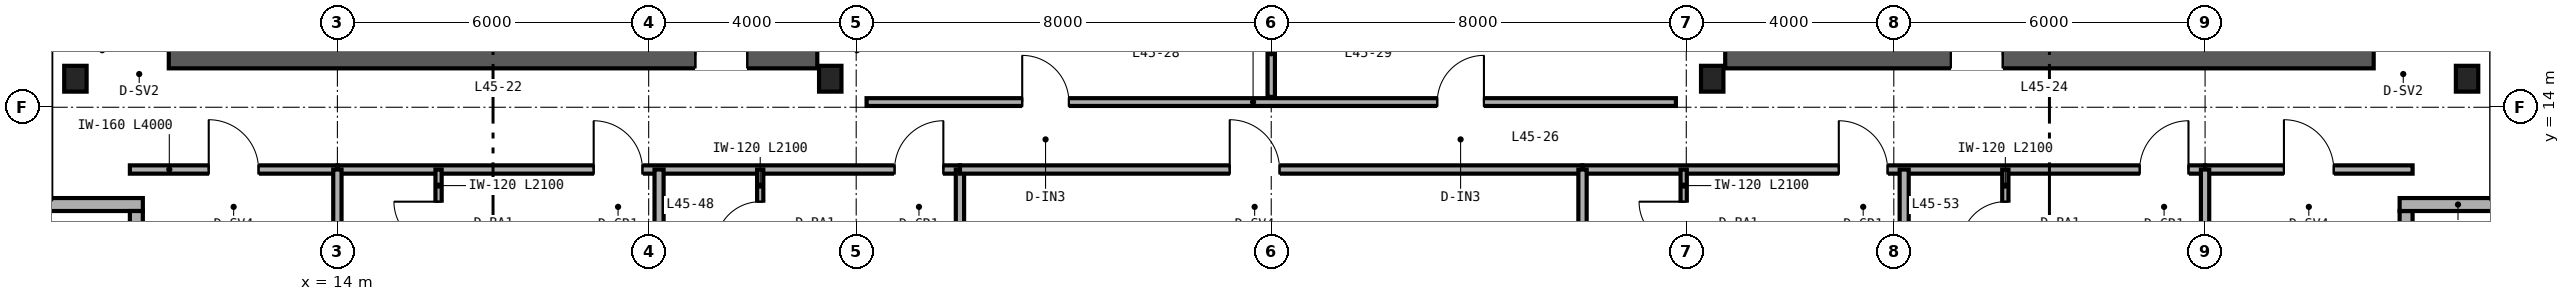
"""IFC4 building model, lengths in metres.
Left out: names, types, materials, properties, quantities, classifications, styles, units other than length and angle.
Written with IfcOpenShell. Run it as: python <this file> out.ifc"""

import sys

from ifc_helpers import new_model, si_unit, direction, frame, frame_2d, origin, origin_2d, place, context, subcontext, project, spatial, rectangle, i_section, extrude, source, transform, mapped, element, fill, save


model = new_model("IFC4")
c1 = context("Model", 3, precision=1e-05, world=origin(), true_north=direction((0.0, 1.0)))
c2 = subcontext(c1, "Body", "Model", "MODEL_VIEW")
j1 = project(units=[si_unit("LENGTHUNIT", "METRE"), si_unit("PLANEANGLEUNIT", "RADIAN")], contexts=[c1])
p1 = place(None, origin())
s1 = spatial("IfcSite", under=j1, at=p1, CompositionType="ELEMENT")
p2 = place(p1, origin())
s2 = spatial("IfcBuilding", under=s1, at=p2, CompositionType="ELEMENT")
p3 = place(p2, frame((0.0, 0.0, 181.2)))
s3 = spatial("IfcBuildingStorey", under=s2, at=p3, CompositionType="ELEMENT", Elevation=181.2)
p4 = place(p3, frame((10.75, 15.0, 0.0), z_axis=(0.0, 0.0, 1.0), x_axis=(1.0, 0.0, 0.0)))
e1 = element("IfcWall", 1, at=p4, inside=s3, PredefinedType="SHEAR", context=c2, shape_type="SweptSolid", body=[
    extrude(rectangle(XDim=12.5, YDim=0.5, at=frame_2d((6.25, 0.0))), origin(), (0.0, 0.0, 1.0), 3.37),
])
p5 = place(p4, frame((10.15, 0.0, 0.0)))
e2 = element("IfcOpeningElement", 2, at=p5, cuts=e1, PredefinedType="OPENING", context=c2, shape_type="SweptSolid", body=[
    extrude(rectangle(XDim=1.0, YDim=2.15, at=frame_2d((0.5, 1.075))), frame((0.0, 0.26, 0.0), z_axis=(0.0, -1.0, 0.0), x_axis=(1.0, 0.0, 0.0)), (0.0, 0.0, 1.0), 0.52),
])
p6 = place(p3, frame((40.75, 15.0, 0.0), z_axis=(0.0, 0.0, 1.0), x_axis=(1.0, 0.0, 0.0)))
e3 = element("IfcWall", 3, at=p6, inside=s3, PredefinedType="SHEAR", context=c2, shape_type="SweptSolid", body=[
    extrude(rectangle(XDim=12.5, YDim=0.5, at=frame_2d((6.25, 0.0))), origin(), (0.0, 0.0, 1.0), 3.37),
])
p7 = place(p6, frame((4.35, 0.0, 0.0)))
e4 = element("IfcOpeningElement", 4, at=p7, cuts=e3, PredefinedType="OPENING", context=c2, shape_type="SweptSolid", body=[
    extrude(rectangle(XDim=1.0, YDim=2.15, at=frame_2d((0.5, 1.075))), frame((0.0, 0.26, 0.0), z_axis=(0.0, -1.0, 0.0), x_axis=(1.0, 0.0, 0.0)), (0.0, 0.0, 1.0), 0.52),
])
m1 = source(origin(), c2, "Body", "SweptSolid", [
    extrude(i_section(OverallWidth=0.432, OverallDepth=0.498, WebThickness=0.056, FlangeThickness=0.089, FilletRadius=0.025, at=origin_2d()), origin(), (0.0, 0.0, 1.0), 3.37),
])
for number, where, z_axis, x_axis in (
    (5, (8.95, 14.55, 0.0), (0.0, 0.0, 1.0), (1.0, 0.0, 0.0)),
    (6, (23.5, 14.55, 0.0), (0.0, 0.0, 1.0), (1.0, 0.0, 0.0)),
    (7, (40.5, 14.55, 0.0), (0.0, 0.0, 1.0), (1.0, 0.0, 0.0)),
    (8, (55.05, 14.55, 0.0), (0.0, 0.0, 1.0), (1.0, 0.0, 0.0)),
):
    element("IfcColumn", number, at=place(p3, frame(where, z_axis=z_axis, x_axis=x_axis)), inside=s3, PredefinedType="COLUMN", context=c2, shape_type="MappedRepresentation", body=[
        mapped(m1, transform((0.0, 0.0, 0.0), scale=1.0)),
    ])
p8 = place(p3, frame((53.875, 10.0, 0.0), z_axis=(0.0, 0.0, 1.0), x_axis=(0.0, 1.0, 0.0)))
e9 = element("IfcWall", 9, at=p8, inside=s3, PredefinedType="SOLIDWALL", context=c2, shape_type="SweptSolid", body=[
    extrude(rectangle(XDim=2.0, YDim=0.25, at=frame_2d((1.0, 0.0))), origin(), (0.0, 0.0, 1.0), 3.37),
])
for number, where, z_axis, x_axis in (
    (10, (53.75, 12.125, 0.0), (0.0, 0.0, 1.0), (1.0, 0.0, 0.0)),
    (11, (8.0, 12.125, 0.0), (0.0, 0.0, 1.0), (1.0, 0.0, 0.0)),
):
    element("IfcWall", number, at=place(p3, frame(where, z_axis=z_axis, x_axis=x_axis)), inside=s3, PredefinedType="SOLIDWALL", context=c2, shape_type="SweptSolid", body=[
        extrude(rectangle(XDim=2.25, YDim=0.25, at=frame_2d((1.125, 0.0))), origin(), (0.0, 0.0, 1.0), 3.37),
    ])
p9 = place(p3, frame((10.125, 12.0, 0.0), z_axis=(0.0, 0.0, 1.0), x_axis=(0.0, -1.0, 0.0)))
e12 = element("IfcWall", 12, at=p9, inside=s3, PredefinedType="SOLIDWALL", context=c2, shape_type="SweptSolid", body=[
    extrude(rectangle(XDim=2.0, YDim=0.25, at=frame_2d((1.0, 0.0))), origin(), (0.0, 0.0, 1.0), 3.37),
])
p10 = place(p3, frame((24.2, 14.1, 0.0), z_axis=(0.0, 0.0, 1.0), x_axis=(1.0, 0.0, 0.0)))
e13 = element("IfcWall", 13, at=p10, inside=s3, PredefinedType="PARTITIONING", context=c2, shape_type="SweptSolid", body=[
    extrude(rectangle(XDim=15.6, YDim=0.15, at=frame_2d((7.8, 0.0))), origin(), (0.0, 0.0, 1.0), 3.37),
])
p11 = place(p10, frame((3.0, 0.0, 0.0)))
e14 = element("IfcOpeningElement", 14, at=p11, cuts=e13, PredefinedType="OPENING", context=c2, shape_type="SweptSolid", body=[
    extrude(rectangle(XDim=0.9, YDim=2.15, at=frame_2d((0.45, 1.075))), frame((0.0, 0.085, 0.0), z_axis=(0.0, -1.0, 0.0), x_axis=(1.0, 0.0, 0.0)), (0.0, 0.0, 1.0), 0.17),
])
p12 = place(p10, frame((11.0, 0.0, 0.0)))
e15 = element("IfcOpeningElement", 15, at=p12, cuts=e13, PredefinedType="OPENING", context=c2, shape_type="SweptSolid", body=[
    extrude(rectangle(XDim=0.9, YDim=2.15, at=frame_2d((0.45, 1.075))), frame((0.0, 0.085, 0.0), z_axis=(0.0, -1.0, 0.0), x_axis=(1.0, 0.0, 0.0)), (0.0, 0.0, 1.0), 0.17),
])
p13 = place(p3, frame((32.0, 14.2, 0.0), z_axis=(0.0, 0.0, 1.0), x_axis=(0.0, 1.0, 0.0)))
e16 = element("IfcWall", 16, at=p13, inside=s3, PredefinedType="PARTITIONING", context=c2, shape_type="SweptSolid", body=[
    extrude(rectangle(XDim=1.68, YDim=0.142, at=frame_2d((0.84, 0.0))), origin(), (0.0, 0.0, 1.0), 3.37),
])
p14 = place(p3, frame((10.0, 12.8, 0.0), z_axis=(0.0, 0.0, 1.0), x_axis=(1.0, 0.0, 0.0)))
e17 = element("IfcWall", 17, at=p14, inside=s3, PredefinedType="PARTITIONING", context=c2, shape_type="SweptSolid", body=[
    extrude(rectangle(XDim=4.0, YDim=0.16, at=frame_2d((2.0, 0.0))), origin(), (0.0, 0.0, 1.0), 3.37),
])
p15 = place(p14, frame((1.52, 0.0, 0.0)))
e18 = element("IfcOpeningElement", 18, at=p15, cuts=e17, PredefinedType="OPENING", context=c2, shape_type="SweptSolid", body=[
    extrude(rectangle(XDim=0.96, YDim=2.15, at=frame_2d((0.48, 1.075))), frame((0.0, 0.09, 0.0), z_axis=(0.0, -1.0, 0.0), x_axis=(1.0, 0.0, 0.0)), (0.0, 0.0, 1.0), 0.18),
])
p16 = place(p3, frame((50.0, 12.8, 0.0), z_axis=(0.0, 0.0, 1.0), x_axis=(1.0, 0.0, 0.0)))
e19 = element("IfcWall", 19, at=p16, inside=s3, PredefinedType="PARTITIONING", context=c2, shape_type="SweptSolid", body=[
    extrude(rectangle(XDim=4.0, YDim=0.16, at=frame_2d((2.0, 0.0))), origin(), (0.0, 0.0, 1.0), 3.37),
])
p17 = place(p16, frame((1.52, 0.0, 0.0)))
e20 = element("IfcOpeningElement", 20, at=p17, cuts=e19, PredefinedType="OPENING", context=c2, shape_type="SweptSolid", body=[
    extrude(rectangle(XDim=0.96, YDim=2.15, at=frame_2d((0.48, 1.075))), frame((0.0, 0.09, 0.0), z_axis=(0.0, -1.0, 0.0), x_axis=(1.0, 0.0, 0.0)), (0.0, 0.0, 1.0), 0.18),
])
p18 = place(p3, frame((14.0, 12.8, 0.0), z_axis=(0.0, 0.0, 1.0), x_axis=(1.0, 0.0, 0.0)))
e21 = element("IfcWall", 21, at=p18, inside=s3, PredefinedType="PARTITIONING", context=c2, shape_type="SweptSolid", body=[
    extrude(rectangle(XDim=12.0, YDim=0.16, at=frame_2d((6.0, 0.0))), origin(), (0.0, 0.0, 1.0), 2.913),
])
p19 = place(p18, frame((4.94, 0.0, 0.0)))
e22 = element("IfcOpeningElement", 22, at=p19, cuts=e21, PredefinedType="OPENING", context=c2, shape_type="SweptSolid", body=[
    extrude(rectangle(XDim=0.94, YDim=2.15, at=frame_2d((0.47, 1.075))), frame((0.0, 0.09, 0.0), z_axis=(0.0, -1.0, 0.0), x_axis=(1.0, 0.0, 0.0)), (0.0, 0.0, 1.0), 0.18),
])
p20 = place(p18, frame((10.74, 0.0, 0.0)))
e23 = element("IfcOpeningElement", 23, at=p20, cuts=e21, PredefinedType="OPENING", context=c2, shape_type="SweptSolid", body=[
    extrude(rectangle(XDim=0.94, YDim=2.15, at=frame_2d((0.47, 1.075))), frame((0.0, 0.09, 0.0), z_axis=(0.0, -1.0, 0.0), x_axis=(1.0, 0.0, 0.0)), (0.0, 0.0, 1.0), 0.18),
])
p21 = place(p3, frame((14.0, 6.36, 0.0), z_axis=(0.0, 0.0, 1.0), x_axis=(0.0, 1.0, 0.0)))
e24 = element("IfcWall", 24, at=p21, inside=s3, PredefinedType="PARTITIONING", context=c2, shape_type="SweptSolid", body=[
    extrude(rectangle(XDim=6.44, YDim=0.16, at=frame_2d((3.22, 0.0))), origin(), (0.0, 0.0, 1.0), 2.677),
])
p22 = place(p3, frame((26.0, 6.36, 0.0), z_axis=(0.0, 0.0, 1.0), x_axis=(0.0, 1.0, 0.0)))
e25 = element("IfcWall", 25, at=p22, inside=s3, PredefinedType="PARTITIONING", context=c2, shape_type="SweptSolid", body=[
    extrude(rectangle(XDim=6.44, YDim=0.16, at=frame_2d((3.22, 0.0))), origin(), (0.0, 0.0, 1.0), 2.443),
])
p23 = place(p3, frame((20.2, 6.36, 0.0), z_axis=(0.0, 0.0, 1.0), x_axis=(0.0, 1.0, 0.0)))
e26 = element("IfcWall", 26, at=p23, inside=s3, PredefinedType="PARTITIONING", context=c2, shape_type="SweptSolid", body=[
    extrude(rectangle(XDim=6.44, YDim=0.175, at=frame_2d((3.22, 0.0))), origin(), (0.0, 0.0, 1.0), 2.677),
])
p24 = place(p3, frame((15.95, 10.7, 0.0), z_axis=(0.0, 0.0, 1.0), x_axis=(0.0, 1.0, 0.0)))
e27 = element("IfcWall", 27, at=p24, inside=s3, PredefinedType="PARTITIONING", context=c2, shape_type="SweptSolid", body=[
    extrude(rectangle(XDim=2.1, YDim=0.12, at=frame_2d((1.05, 0.0))), origin(), (0.0, 0.0, 1.0), 3.37),
])
p25 = place(p24, frame((0.62, 0.0, 0.0)))
e28 = element("IfcOpeningElement", 28, at=p25, cuts=e27, PredefinedType="OPENING", context=c2, shape_type="SweptSolid", body=[
    extrude(rectangle(XDim=0.86, YDim=2.1, at=frame_2d((0.43, 1.05))), frame((0.0, 0.07, 0.0), z_axis=(0.0, -1.0, 0.0), x_axis=(1.0, 0.0, 0.0)), (0.0, 0.0, 1.0), 0.14),
])
p26 = place(p3, frame((22.15, 10.7, 0.0), z_axis=(0.0, 0.0, 1.0), x_axis=(0.0, 1.0, 0.0)))
e29 = element("IfcWall", 29, at=p26, inside=s3, PredefinedType="PARTITIONING", context=c2, shape_type="SweptSolid", body=[
    extrude(rectangle(XDim=2.1, YDim=0.12, at=frame_2d((1.05, 0.0))), origin(), (0.0, 0.0, 1.0), 3.37),
])
p27 = place(p26, frame((0.62, 0.0, 0.0)))
e30 = element("IfcOpeningElement", 30, at=p27, cuts=e29, PredefinedType="OPENING", context=c2, shape_type="SweptSolid", body=[
    extrude(rectangle(XDim=0.86, YDim=2.1, at=frame_2d((0.43, 1.05))), frame((0.0, 0.07, 0.0), z_axis=(0.0, -1.0, 0.0), x_axis=(1.0, 0.0, 0.0)), (0.0, 0.0, 1.0), 0.14),
])
p28 = place(p3, frame((26.0, 12.8, 0.0), z_axis=(0.0, 0.0, 1.0), x_axis=(1.0, 0.0, 0.0)))
e31 = element("IfcWall", 31, at=p28, inside=s3, PredefinedType="PARTITIONING", context=c2, shape_type="SweptSolid", body=[
    extrude(rectangle(XDim=12.0, YDim=0.16, at=frame_2d((6.0, 0.0))), origin(), (0.0, 0.0, 1.0), 3.37),
])
p29 = place(p28, frame((5.2, 0.0, 0.0)))
e32 = element("IfcOpeningElement", 32, at=p29, cuts=e31, PredefinedType="OPENING", context=c2, shape_type="SweptSolid", body=[
    extrude(rectangle(XDim=0.96, YDim=2.15, at=frame_2d((0.48, 1.075))), frame((0.0, 0.09, 0.0), z_axis=(0.0, -1.0, 0.0), x_axis=(1.0, 0.0, 0.0)), (0.0, 0.0, 1.0), 0.18),
])
p30 = place(p3, frame((38.0, 12.8, 0.0), z_axis=(0.0, 0.0, 1.0), x_axis=(1.0, 0.0, 0.0)))
e33 = element("IfcWall", 33, at=p30, inside=s3, PredefinedType="PARTITIONING", context=c2, shape_type="SweptSolid", body=[
    extrude(rectangle(XDim=12.0, YDim=0.16, at=frame_2d((6.0, 0.0))), origin(), (0.0, 0.0, 1.0), 2.913),
])
p31 = place(p30, frame((4.94, 0.0, 0.0)))
e34 = element("IfcOpeningElement", 34, at=p31, cuts=e33, PredefinedType="OPENING", context=c2, shape_type="SweptSolid", body=[
    extrude(rectangle(XDim=0.94, YDim=2.15, at=frame_2d((0.47, 1.075))), frame((0.0, 0.09, 0.0), z_axis=(0.0, -1.0, 0.0), x_axis=(1.0, 0.0, 0.0)), (0.0, 0.0, 1.0), 0.18),
])
p32 = place(p30, frame((10.74, 0.0, 0.0)))
e35 = element("IfcOpeningElement", 35, at=p32, cuts=e33, PredefinedType="OPENING", context=c2, shape_type="SweptSolid", body=[
    extrude(rectangle(XDim=0.94, YDim=2.15, at=frame_2d((0.47, 1.075))), frame((0.0, 0.09, 0.0), z_axis=(0.0, -1.0, 0.0), x_axis=(1.0, 0.0, 0.0)), (0.0, 0.0, 1.0), 0.18),
])
p33 = place(p3, frame((38.0, 6.36, 0.0), z_axis=(0.0, 0.0, 1.0), x_axis=(0.0, 1.0, 0.0)))
e36 = element("IfcWall", 36, at=p33, inside=s3, PredefinedType="PARTITIONING", context=c2, shape_type="SweptSolid", body=[
    extrude(rectangle(XDim=6.44, YDim=0.16, at=frame_2d((3.22, 0.0))), origin(), (0.0, 0.0, 1.0), 2.443),
])
p34 = place(p3, frame((50.0, 6.36, 0.0), z_axis=(0.0, 0.0, 1.0), x_axis=(0.0, 1.0, 0.0)))
e37 = element("IfcWall", 37, at=p34, inside=s3, PredefinedType="PARTITIONING", context=c2, shape_type="SweptSolid", body=[
    extrude(rectangle(XDim=6.44, YDim=0.16, at=frame_2d((3.22, 0.0))), origin(), (0.0, 0.0, 1.0), 2.677),
])
p35 = place(p3, frame((44.2, 6.36, 0.0), z_axis=(0.0, 0.0, 1.0), x_axis=(0.0, 1.0, 0.0)))
e38 = element("IfcWall", 38, at=p35, inside=s3, PredefinedType="PARTITIONING", context=c2, shape_type="SweptSolid", body=[
    extrude(rectangle(XDim=6.44, YDim=0.175, at=frame_2d((3.22, 0.0))), origin(), (0.0, 0.0, 1.0), 2.677),
])
p36 = place(p3, frame((39.95, 10.7, 0.0), z_axis=(0.0, 0.0, 1.0), x_axis=(0.0, 1.0, 0.0)))
e39 = element("IfcWall", 39, at=p36, inside=s3, PredefinedType="PARTITIONING", context=c2, shape_type="SweptSolid", body=[
    extrude(rectangle(XDim=2.1, YDim=0.12, at=frame_2d((1.05, 0.0))), origin(), (0.0, 0.0, 1.0), 3.37),
])
p37 = place(p36, frame((0.62, 0.0, 0.0)))
e40 = element("IfcOpeningElement", 40, at=p37, cuts=e39, PredefinedType="OPENING", context=c2, shape_type="SweptSolid", body=[
    extrude(rectangle(XDim=0.86, YDim=2.1, at=frame_2d((0.43, 1.05))), frame((0.0, 0.07, 0.0), z_axis=(0.0, -1.0, 0.0), x_axis=(1.0, 0.0, 0.0)), (0.0, 0.0, 1.0), 0.14),
])
p38 = place(p3, frame((46.15, 10.7, 0.0), z_axis=(0.0, 0.0, 1.0), x_axis=(0.0, 1.0, 0.0)))
e41 = element("IfcWall", 41, at=p38, inside=s3, PredefinedType="PARTITIONING", context=c2, shape_type="SweptSolid", body=[
    extrude(rectangle(XDim=2.1, YDim=0.12, at=frame_2d((1.05, 0.0))), origin(), (0.0, 0.0, 1.0), 3.37),
])
p39 = place(p38, frame((0.62, 0.0, 0.0)))
e42 = element("IfcOpeningElement", 42, at=p39, cuts=e41, PredefinedType="OPENING", context=c2, shape_type="SweptSolid", body=[
    extrude(rectangle(XDim=0.86, YDim=2.1, at=frame_2d((0.43, 1.05))), frame((0.0, 0.07, 0.0), z_axis=(0.0, -1.0, 0.0), x_axis=(1.0, 0.0, 0.0)), (0.0, 0.0, 1.0), 0.14),
])
m2 = source(origin(), c2, "Body", "SweptSolid", [
    extrude(rectangle(XDim=1.0, YDim=2.15, at=frame_2d((0.5, 1.075))), frame((0.0, 0.025, 0.0), z_axis=(0.0, -1.0, 0.0), x_axis=(1.0, 0.0, 0.0)), (0.0, 0.0, 1.0), 0.05),
])
p40 = place(p5, origin())
e43 = element("IfcDoor", 43, at=p40, inside=s3, OperationType="SINGLE_SWING_LEFT", PredefinedType="DOOR", context=c2, shape_type="MappedRepresentation", body=[
    mapped(m2, transform((0.0, 0.0, 0.0), scale=1.0)),
])
fill(e2, e43)
p41 = place(p7, origin())
e44 = element("IfcDoor", 44, at=p41, inside=s3, OperationType="SINGLE_SWING_RIGHT", PredefinedType="DOOR", context=c2, shape_type="MappedRepresentation", body=[
    mapped(m2, transform((0.0, 0.0, 0.0), scale=1.0)),
])
fill(e4, e44)
m3 = source(origin(), c2, "Body", "SweptSolid", [
    extrude(rectangle(XDim=0.9, YDim=2.15, at=frame_2d((0.45, 1.075))), frame((0.0, 0.025, 0.0), z_axis=(0.0, -1.0, 0.0), x_axis=(1.0, 0.0, 0.0)), (0.0, 0.0, 1.0), 0.05),
])
p42 = place(p11, origin())
e45 = element("IfcDoor", 45, at=p42, inside=s3, OperationType="SINGLE_SWING_LEFT", PredefinedType="DOOR", context=c2, shape_type="MappedRepresentation", body=[
    mapped(m3, transform((0.0, 0.0, 0.0), scale=1.0)),
])
fill(e14, e45)
p43 = place(p12, origin())
e46 = element("IfcDoor", 46, at=p43, inside=s3, OperationType="SINGLE_SWING_RIGHT", PredefinedType="DOOR", context=c2, shape_type="MappedRepresentation", body=[
    mapped(m3, transform((0.0, 0.0, 0.0), scale=1.0)),
])
fill(e15, e46)
m4 = source(origin(), c2, "Body", "SweptSolid", [
    extrude(rectangle(XDim=0.96, YDim=2.15, at=frame_2d((0.48, 1.075))), frame((0.0, 0.025, 0.0), z_axis=(0.0, -1.0, 0.0), x_axis=(1.0, 0.0, 0.0)), (0.0, 0.0, 1.0), 0.05),
])
p44 = place(p15, origin())
e47 = element("IfcDoor", 47, at=p44, inside=s3, OperationType="SINGLE_SWING_LEFT", PredefinedType="DOOR", context=c2, shape_type="MappedRepresentation", body=[
    mapped(m4, transform((0.0, 0.0, 0.0), scale=1.0)),
])
fill(e18, e47)
p45 = place(p17, origin())
e48 = element("IfcDoor", 48, at=p45, inside=s3, OperationType="SINGLE_SWING_LEFT", PredefinedType="DOOR", context=c2, shape_type="MappedRepresentation", body=[
    mapped(m4, transform((0.0, 0.0, 0.0), scale=1.0)),
])
fill(e20, e48)
m5 = source(origin(), c2, "Body", "SweptSolid", [
    extrude(rectangle(XDim=0.86, YDim=2.1, at=frame_2d((0.43, 1.05))), frame((0.0, 0.025, 0.0), z_axis=(0.0, -1.0, 0.0), x_axis=(1.0, 0.0, 0.0)), (0.0, 0.0, 1.0), 0.05),
])
p46 = place(p25, origin())
e49 = element("IfcDoor", 49, at=p46, inside=s3, OperationType="SINGLE_SWING_RIGHT", PredefinedType="DOOR", context=c2, shape_type="MappedRepresentation", body=[
    mapped(m5, transform((0.0, 0.0, 0.0), scale=1.0)),
])
fill(e28, e49)
p47 = place(p27, origin())
e50 = element("IfcDoor", 50, at=p47, inside=s3, OperationType="SINGLE_SWING_LEFT", PredefinedType="DOOR", context=c2, shape_type="MappedRepresentation", body=[
    mapped(m5, transform((0.0, 0.0, 0.0), scale=1.0)),
])
fill(e30, e50)
m6 = source(origin(), c2, "Body", "SweptSolid", [
    extrude(rectangle(XDim=0.94, YDim=2.15, at=frame_2d((0.47, 1.075))), frame((0.0, 0.025, 0.0), z_axis=(0.0, -1.0, 0.0), x_axis=(1.0, 0.0, 0.0)), (0.0, 0.0, 1.0), 0.05),
])
p48 = place(p19, origin())
e51 = element("IfcDoor", 51, at=p48, inside=s3, OperationType="SINGLE_SWING_LEFT", PredefinedType="DOOR", context=c2, shape_type="MappedRepresentation", body=[
    mapped(m6, transform((0.0, 0.0, 0.0), scale=1.0)),
])
fill(e22, e51)
p49 = place(p20, origin())
e52 = element("IfcDoor", 52, at=p49, inside=s3, OperationType="SINGLE_SWING_RIGHT", PredefinedType="DOOR", context=c2, shape_type="MappedRepresentation", body=[
    mapped(m6, transform((0.0, 0.0, 0.0), scale=1.0)),
])
fill(e23, e52)
p50 = place(p29, origin())
e53 = element("IfcDoor", 53, at=p50, inside=s3, OperationType="SINGLE_SWING_LEFT", PredefinedType="DOOR", context=c2, shape_type="MappedRepresentation", body=[
    mapped(m4, transform((0.0, 0.0, 0.0), scale=1.0)),
])
fill(e32, e53)
p51 = place(p37, origin())
e54 = element("IfcDoor", 54, at=p51, inside=s3, OperationType="SINGLE_SWING_RIGHT", PredefinedType="DOOR", context=c2, shape_type="MappedRepresentation", body=[
    mapped(m5, transform((0.0, 0.0, 0.0), scale=1.0)),
])
fill(e40, e54)
p52 = place(p39, origin())
e55 = element("IfcDoor", 55, at=p52, inside=s3, OperationType="SINGLE_SWING_LEFT", PredefinedType="DOOR", context=c2, shape_type="MappedRepresentation", body=[
    mapped(m5, transform((0.0, 0.0, 0.0), scale=1.0)),
])
fill(e42, e55)
p53 = place(p31, origin())
e56 = element("IfcDoor", 56, at=p53, inside=s3, OperationType="SINGLE_SWING_LEFT", PredefinedType="DOOR", context=c2, shape_type="MappedRepresentation", body=[
    mapped(m6, transform((0.0, 0.0, 0.0), scale=1.0)),
])
fill(e34, e56)
p54 = place(p32, origin())
e57 = element("IfcDoor", 57, at=p54, inside=s3, OperationType="SINGLE_SWING_RIGHT", PredefinedType="DOOR", context=c2, shape_type="MappedRepresentation", body=[
    mapped(m6, transform((0.0, 0.0, 0.0), scale=1.0)),
])
fill(e35, e57)
save(model, sys.argv[1])
